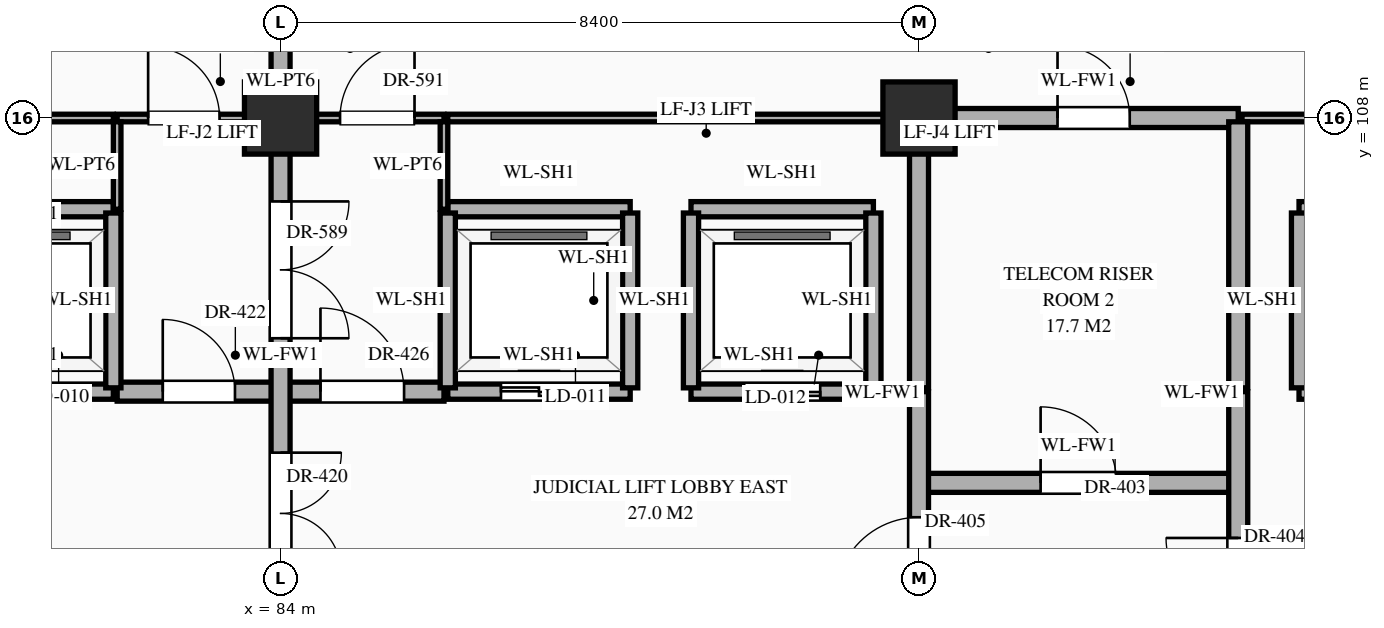
"""IFC4 building model, lengths in metres.
Left out: names, types, materials, properties, quantities, classifications, styles, units other than length and angle.
Written with IfcOpenShell. Run it as: python <this file> out.ifc"""

import sys

from ifc_helpers import new_model, si_unit, direction, frame, frame_2d, origin, origin_2d, place, context, subcontext, project, spatial, rectangle, extrude, element, fill, save


model = new_model("IFC4")
c1 = context("Model", 3, precision=1e-05, world=origin(), true_north=direction((0.0, 1.0)))
c2 = subcontext(c1, "Body", "Model", "MODEL_VIEW")
j1 = project(units=[si_unit("LENGTHUNIT", "METRE"), si_unit("PLANEANGLEUNIT", "RADIAN")], contexts=[c1])
p1 = place(None, origin())
s1 = spatial("IfcSite", under=j1, at=p1, CompositionType="ELEMENT")
p2 = place(p1, origin())
s2 = spatial("IfcBuilding", under=s1, at=p2, CompositionType="ELEMENT")
p3 = place(p2, frame((0.0, 0.0, -5.4)))
s3 = spatial("IfcBuildingStorey", under=s2, at=p3, CompositionType="ELEMENT", Elevation=-5.4)
for number, where, z_axis, x_axis in (
    (1, (84.0, 108.0, 0.0), (0.0, 0.0, 1.0), (1.0, 0.0, 0.0)),
    (2, (92.4, 108.0, 0.0), (0.0, 0.0, 1.0), (1.0, 0.0, 0.0)),
):
    element("IfcColumn", number, at=place(p3, frame(where, z_axis=z_axis, x_axis=x_axis)), inside=s3, PredefinedType="COLUMN", context=c2, shape_type="SweptSolid", body=[
        extrude(rectangle(XDim=0.95, YDim=0.95, at=origin_2d()), origin(), (0.0, 0.0, 1.0), 5.4),
    ])
p4 = place(p3, frame((92.4, 103.2, 0.0), z_axis=(0.0, 0.0, 1.0), x_axis=(1.0, 0.0, 0.0)))
e3 = element("IfcWall", 3, at=p4, inside=s3, PredefinedType="STANDARD", context=c2, shape_type="SweptSolid", body=[
    extrude(rectangle(XDim=4.2, YDim=0.25, at=frame_2d((2.1, 0.0))), origin(), (0.0, 0.0, 1.0), 5.1),
])
p5 = place(p4, frame((1.6, 0.0, 0.0)))
e4 = element("IfcOpeningElement", 4, at=p5, cuts=e3, PredefinedType="OPENING", context=c2, shape_type="SweptSolid", body=[
    extrude(rectangle(XDim=1.0, YDim=2.2, at=frame_2d((0.5, 1.1))), frame((0.0, 0.137, 0.0), z_axis=(0.0, -1.0, 0.0), x_axis=(1.0, 0.0, 0.0)), (0.0, 0.0, 1.0), 0.274),
])
p6 = place(p3, frame((79.4, 104.4, 0.0), z_axis=(0.0, 0.0, 1.0), x_axis=(1.0, 0.0, 0.0)))
e5 = element("IfcWall", 5, at=p6, inside=s3, PredefinedType="STANDARD", context=c2, shape_type="SweptSolid", body=[
    extrude(rectangle(XDim=2.4, YDim=0.2, at=frame_2d((1.2, 0.0))), origin(), (0.0, 0.0, 1.0), 5.1),
])
p7 = place(p6, frame((0.7, 0.0, 0.0)))
e6 = element("IfcOpeningElement", 6, at=p7, cuts=e5, PredefinedType="OPENING", context=c2, shape_type="SweptSolid", body=[
    extrude(rectangle(XDim=1.0, YDim=2.15, at=frame_2d((0.5, 1.075))), frame((0.0, 0.112, 0.0), z_axis=(0.0, -1.0, 0.0), x_axis=(1.0, 0.0, 0.0)), (0.0, 0.0, 1.0), 0.224),
])
p8 = place(p3, frame((81.85, 104.4, 0.0), z_axis=(0.0, 0.0, 1.0), x_axis=(1.0, 0.0, 0.0)))
e7 = element("IfcWall", 7, at=p8, inside=s3, PredefinedType="STANDARD", context=c2, shape_type="SweptSolid", body=[
    extrude(rectangle(XDim=4.3, YDim=0.25, at=frame_2d((2.15, 0.0))), origin(), (0.0, 0.0, 1.0), 5.1),
])
p9 = place(p8, frame((0.6, 0.0, 0.0)))
e8 = element("IfcOpeningElement", 8, at=p9, cuts=e7, PredefinedType="OPENING", context=c2, shape_type="SweptSolid", body=[
    extrude(rectangle(XDim=0.95, YDim=2.15, at=frame_2d((0.475, 1.075))), frame((0.0, 0.137, 0.0), z_axis=(0.0, -1.0, 0.0), x_axis=(1.0, 0.0, 0.0)), (0.0, 0.0, 1.0), 0.274),
])
p10 = place(p8, frame((2.675, 0.0, 0.0)))
e9 = element("IfcOpeningElement", 9, at=p10, cuts=e7, PredefinedType="OPENING", context=c2, shape_type="SweptSolid", body=[
    extrude(rectangle(XDim=1.1, YDim=2.2, at=frame_2d((0.55, 1.1))), frame((0.0, 0.137, 0.0), z_axis=(0.0, -1.0, 0.0), x_axis=(1.0, 0.0, 0.0)), (0.0, 0.0, 1.0), 0.274),
])
p11 = place(p3, frame((86.2, 104.4, 0.0), z_axis=(0.0, 0.0, 1.0), x_axis=(1.0, 0.0, 0.0)))
e10 = element("IfcWall", 10, at=p11, inside=s3, PredefinedType="STANDARD", context=c2, shape_type="SweptSolid", body=[
    extrude(rectangle(XDim=2.4, YDim=0.2, at=frame_2d((1.2, 0.0))), origin(), (0.0, 0.0, 1.0), 5.1),
])
p12 = place(p11, frame((0.7, 0.0, 0.0)))
e11 = element("IfcOpeningElement", 11, at=p12, cuts=e10, PredefinedType="OPENING", context=c2, shape_type="SweptSolid", body=[
    extrude(rectangle(XDim=1.0, YDim=2.15, at=frame_2d((0.5, 1.075))), frame((0.0, 0.112, 0.0), z_axis=(0.0, -1.0, 0.0), x_axis=(1.0, 0.0, 0.0)), (0.0, 0.0, 1.0), 0.224),
])
p13 = place(p3, frame((89.4, 104.4, 0.0), z_axis=(0.0, 0.0, 1.0), x_axis=(1.0, 0.0, 0.0)))
e12 = element("IfcWall", 12, at=p13, inside=s3, PredefinedType="STANDARD", context=c2, shape_type="SweptSolid", body=[
    extrude(rectangle(XDim=2.4, YDim=0.2, at=frame_2d((1.2, 0.0))), origin(), (0.0, 0.0, 1.0), 5.1),
])
p14 = place(p13, frame((0.7, 0.0, 0.0)))
e13 = element("IfcOpeningElement", 13, at=p14, cuts=e12, PredefinedType="OPENING", context=c2, shape_type="SweptSolid", body=[
    extrude(rectangle(XDim=1.0, YDim=2.15, at=frame_2d((0.5, 1.075))), frame((0.0, 0.112, 0.0), z_axis=(0.0, -1.0, 0.0), x_axis=(1.0, 0.0, 0.0)), (0.0, 0.0, 1.0), 0.224),
])
p15 = place(p3, frame((97.4, 104.4, 0.0), z_axis=(0.0, 0.0, 1.0), x_axis=(1.0, 0.0, 0.0)))
e14 = element("IfcWall", 14, at=p15, inside=s3, PredefinedType="STANDARD", context=c2, shape_type="SweptSolid", body=[
    extrude(rectangle(XDim=3.0, YDim=0.2, at=frame_2d((1.5, 0.0))), origin(), (0.0, 0.0, 1.0), 5.1),
])
p16 = place(p15, frame((0.9, 0.0, 0.0)))
e15 = element("IfcOpeningElement", 15, at=p16, cuts=e14, PredefinedType="OPENING", context=c2, shape_type="SweptSolid", body=[
    extrude(rectangle(XDim=1.2, YDim=2.15, at=frame_2d((0.6, 1.075))), frame((0.0, 0.112, 0.0), z_axis=(0.0, -1.0, 0.0), x_axis=(1.0, 0.0, 0.0)), (0.0, 0.0, 1.0), 0.224),
])
for number, where, z_axis, x_axis in (
    (16, (79.4, 106.8, 0.0), (0.0, 0.0, 1.0), (1.0, 0.0, 0.0)),
    (17, (86.2, 106.8, 0.0), (0.0, 0.0, 1.0), (1.0, 0.0, 0.0)),
    (18, (89.4, 106.8, 0.0), (0.0, 0.0, 1.0), (1.0, 0.0, 0.0)),
):
    element("IfcWall", number, at=place(p3, frame(where, z_axis=z_axis, x_axis=x_axis)), inside=s3, PredefinedType="STANDARD", context=c2, shape_type="SweptSolid", body=[
        extrude(rectangle(XDim=2.4, YDim=0.2, at=frame_2d((1.2, 0.0))), origin(), (0.0, 0.0, 1.0), 5.1),
    ])
p17 = place(p3, frame((97.4, 106.8, 0.0), z_axis=(0.0, 0.0, 1.0), x_axis=(1.0, 0.0, 0.0)))
e19 = element("IfcWall", 19, at=p17, inside=s3, PredefinedType="STANDARD", context=c2, shape_type="SweptSolid", body=[
    extrude(rectangle(XDim=3.0, YDim=0.2, at=frame_2d((1.5, 0.0))), origin(), (0.0, 0.0, 1.0), 5.1),
])
p18 = place(p3, frame((75.65, 108.0, 0.0), z_axis=(0.0, 0.0, 1.0), x_axis=(1.0, 0.0, 0.0)))
e20 = element("IfcWall", 20, at=p18, inside=s3, PredefinedType="STANDARD", context=c2, shape_type="SweptSolid", body=[
    extrude(rectangle(XDim=6.15, YDim=0.1, at=frame_2d((3.075, 0.0))), origin(), (0.0, 0.0, 1.0), 4.25),
])
p19 = place(p3, frame((81.85, 108.0, 0.0), z_axis=(0.0, 0.0, 1.0), x_axis=(1.0, 0.0, 0.0)))
e21 = element("IfcWall", 21, at=p19, inside=s3, PredefinedType="STANDARD", context=c2, shape_type="SweptSolid", body=[
    extrude(rectangle(XDim=4.3, YDim=0.1, at=frame_2d((2.15, 0.0))), origin(), (0.0, 0.0, 1.0), 4.25),
])
p20 = place(p19, frame((0.407, 0.0, 0.0)))
e22 = element("IfcOpeningElement", 22, at=p20, cuts=e21, PredefinedType="OPENING", context=c2, shape_type="SweptSolid", body=[
    extrude(rectangle(XDim=0.94, YDim=2.3, at=frame_2d((0.47, 1.15))), frame((0.0, 0.062, 0.0), z_axis=(0.0, -1.0, 0.0), x_axis=(1.0, 0.0, 0.0)), (0.0, 0.0, 1.0), 0.124),
])
p21 = place(p19, frame((2.933, 0.0, 0.0)))
e23 = element("IfcOpeningElement", 23, at=p21, cuts=e21, PredefinedType="OPENING", context=c2, shape_type="SweptSolid", body=[
    extrude(rectangle(XDim=0.98, YDim=2.35, at=frame_2d((0.49, 1.175))), frame((0.0, 0.062, 0.0), z_axis=(0.0, -1.0, 0.0), x_axis=(1.0, 0.0, 0.0)), (0.0, 0.0, 1.0), 0.124),
])
p22 = place(p3, frame((86.2, 108.0, 0.0), z_axis=(0.0, 0.0, 1.0), x_axis=(1.0, 0.0, 0.0)))
e24 = element("IfcWall", 24, at=p22, inside=s3, PredefinedType="STANDARD", context=c2, shape_type="SweptSolid", body=[
    extrude(rectangle(XDim=6.15, YDim=0.1, at=frame_2d((3.075, 0.0))), origin(), (0.0, 0.0, 1.0), 4.25),
])
p23 = place(p3, frame((92.4, 108.0, 0.0), z_axis=(0.0, 0.0, 1.0), x_axis=(1.0, 0.0, 0.0)))
e25 = element("IfcWall", 25, at=p23, inside=s3, PredefinedType="STANDARD", context=c2, shape_type="SweptSolid", body=[
    extrude(rectangle(XDim=4.2, YDim=0.25, at=frame_2d((2.1, 0.0))), origin(), (0.0, 0.0, 1.0), 4.25),
])
p24 = place(p23, frame((1.823, 0.0, 0.0)))
e26 = element("IfcOpeningElement", 26, at=p24, cuts=e25, PredefinedType="OPENING", context=c2, shape_type="SweptSolid", body=[
    extrude(rectangle(XDim=0.95, YDim=2.15, at=frame_2d((0.475, 1.075))), frame((0.0, 0.137, 0.0), z_axis=(0.0, -1.0, 0.0), x_axis=(1.0, 0.0, 0.0)), (0.0, 0.0, 1.0), 0.274),
])
p25 = place(p3, frame((96.65, 108.0, 0.0), z_axis=(0.0, 0.0, 1.0), x_axis=(1.0, 0.0, 0.0)))
e27 = element("IfcWall", 27, at=p25, inside=s3, PredefinedType="STANDARD", context=c2, shape_type="SweptSolid", body=[
    extrude(rectangle(XDim=4.1, YDim=0.1, at=frame_2d((2.05, 0.0))), origin(), (0.0, 0.0, 1.0), 4.25),
])
p26 = place(p3, frame((81.8, 104.45, 0.0), z_axis=(0.0, 0.0, 1.0), x_axis=(0.0, 1.0, 0.0)))
e28 = element("IfcWall", 28, at=p26, inside=s3, PredefinedType="STANDARD", context=c2, shape_type="SweptSolid", body=[
    extrude(rectangle(XDim=2.3, YDim=0.2, at=frame_2d((1.15, 0.0))), origin(), (0.0, 0.0, 1.0), 5.1),
])
p27 = place(p3, frame((81.85, 106.8, 0.0), z_axis=(0.0, 0.0, 1.0), x_axis=(0.0, 1.0, 0.0)))
e29 = element("IfcWall", 29, at=p27, inside=s3, PredefinedType="STANDARD", context=c2, shape_type="SweptSolid", body=[
    extrude(rectangle(XDim=1.15, YDim=0.1, at=frame_2d((0.575, 0.0))), origin(), (0.0, 0.0, 1.0), 5.1),
])
p28 = place(p3, frame((84.0, 79.2, 0.0), z_axis=(0.0, 0.0, 1.0), x_axis=(0.0, 1.0, 0.0)))
e30 = element("IfcWall", 30, at=p28, inside=s3, PredefinedType="STANDARD", context=c2, shape_type="SweptSolid", body=[
    extrude(rectangle(XDim=35.96, YDim=0.25, at=frame_2d((17.98, 0.0))), origin(), (0.0, 0.0, 1.0), 4.35),
])
p29 = place(p28, frame((22.798, 0.0, 0.0)))
e31 = element("IfcOpeningElement", 31, at=p29, cuts=e30, PredefinedType="OPENING", context=c2, shape_type="SweptSolid", body=[
    extrude(rectangle(XDim=1.6, YDim=2.3, at=frame_2d((0.8, 1.15))), frame((0.0, 0.137, 0.0), z_axis=(0.0, -1.0, 0.0), x_axis=(1.0, 0.0, 0.0)), (0.0, 0.0, 1.0), 0.274),
])
p30 = place(p28, frame((12.528, 0.0, 0.0)))
e32 = element("IfcOpeningElement", 32, at=p30, cuts=e30, PredefinedType="OPENING", context=c2, shape_type="SweptSolid", body=[
    extrude(rectangle(XDim=0.95, YDim=2.15, at=frame_2d((0.475, 1.075))), frame((0.0, 0.137, 0.0), z_axis=(0.0, -1.0, 0.0), x_axis=(1.0, 0.0, 0.0)), (0.0, 0.0, 1.0), 0.274),
])
p31 = place(p28, frame((15.323, 0.0, 0.0)))
e33 = element("IfcOpeningElement", 33, at=p31, cuts=e30, PredefinedType="OPENING", context=c2, shape_type="SweptSolid", body=[
    extrude(rectangle(XDim=0.95, YDim=2.15, at=frame_2d((0.475, 1.075))), frame((0.0, 0.137, 0.0), z_axis=(0.0, -1.0, 0.0), x_axis=(1.0, 0.0, 0.0)), (0.0, 0.0, 1.0), 0.274),
])
p32 = place(p28, frame((25.903, 0.0, 0.0)))
e34 = element("IfcOpeningElement", 34, at=p32, cuts=e30, PredefinedType="OPENING", context=c2, shape_type="SweptSolid", body=[
    extrude(rectangle(XDim=1.8, YDim=2.35, at=frame_2d((0.9, 1.175))), frame((0.0, 0.137, 0.0), z_axis=(0.0, -1.0, 0.0), x_axis=(1.0, 0.0, 0.0)), (0.0, 0.0, 1.0), 0.274),
])
p33 = place(p28, frame((29.722, 0.0, 0.0)))
e35 = element("IfcOpeningElement", 35, at=p33, cuts=e30, PredefinedType="OPENING", context=c2, shape_type="SweptSolid", body=[
    extrude(rectangle(XDim=0.95, YDim=2.15, at=frame_2d((0.475, 1.075))), frame((0.0, 0.137, 0.0), z_axis=(0.0, -1.0, 0.0), x_axis=(1.0, 0.0, 0.0)), (0.0, 0.0, 1.0), 0.274),
])
p34 = place(p28, frame((5.327, 0.0, 0.0)))
e36 = element("IfcOpeningElement", 36, at=p34, cuts=e30, PredefinedType="OPENING", context=c2, shape_type="SweptSolid", body=[
    extrude(rectangle(XDim=0.95, YDim=2.15, at=frame_2d((0.475, 1.075))), frame((0.0, 0.137, 0.0), z_axis=(0.0, -1.0, 0.0), x_axis=(1.0, 0.0, 0.0)), (0.0, 0.0, 1.0), 0.274),
])
p35 = place(p3, frame((86.15, 106.8, 0.0), z_axis=(0.0, 0.0, 1.0), x_axis=(0.0, 1.0, 0.0)))
e37 = element("IfcWall", 37, at=p35, inside=s3, PredefinedType="STANDARD", context=c2, shape_type="SweptSolid", body=[
    extrude(rectangle(XDim=1.15, YDim=0.1, at=frame_2d((0.575, 0.0))), origin(), (0.0, 0.0, 1.0), 5.1),
])
for number, where, z_axis, x_axis in (
    (38, (86.2, 104.45, 0.0), (0.0, 0.0, 1.0), (0.0, 1.0, 0.0)),
    (39, (88.6, 104.45, 0.0), (0.0, 0.0, 1.0), (0.0, 1.0, 0.0)),
    (40, (89.4, 104.45, 0.0), (0.0, 0.0, 1.0), (0.0, 1.0, 0.0)),
    (41, (91.8, 104.45, 0.0), (0.0, 0.0, 1.0), (0.0, 1.0, 0.0)),
):
    element("IfcWall", number, at=place(p3, frame(where, z_axis=z_axis, x_axis=x_axis)), inside=s3, PredefinedType="STANDARD", context=c2, shape_type="SweptSolid", body=[
        extrude(rectangle(XDim=2.3, YDim=0.2, at=frame_2d((1.15, 0.0))), origin(), (0.0, 0.0, 1.0), 5.1),
    ])
p36 = place(p3, frame((92.4, 100.8, 0.0), z_axis=(0.0, 0.0, 1.0), x_axis=(0.0, 1.0, 0.0)))
e42 = element("IfcWall", 42, at=p36, inside=s3, PredefinedType="STANDARD", context=c2, shape_type="SweptSolid", body=[
    extrude(rectangle(XDim=3.6, YDim=0.25, at=frame_2d((1.8, 0.0))), origin(), (0.0, 0.0, 1.0), 4.35),
])
p37 = place(p36, frame((0.847, 0.0, 0.0)))
e43 = element("IfcOpeningElement", 43, at=p37, cuts=e42, PredefinedType="OPENING", context=c2, shape_type="SweptSolid", body=[
    extrude(rectangle(XDim=1.1, YDim=2.2, at=frame_2d((0.55, 1.1))), frame((0.0, 0.137, 0.0), z_axis=(0.0, -1.0, 0.0), x_axis=(1.0, 0.0, 0.0)), (0.0, 0.0, 1.0), 0.274),
])
p38 = place(p3, frame((92.4, 104.45, 0.0), z_axis=(0.0, 0.0, 1.0), x_axis=(0.0, 1.0, 0.0)))
e44 = element("IfcWall", 44, at=p38, inside=s3, PredefinedType="STANDARD", context=c2, shape_type="SweptSolid", body=[
    extrude(rectangle(XDim=3.5, YDim=0.25, at=frame_2d((1.75, 0.0))), origin(), (0.0, 0.0, 1.0), 4.35),
])
p39 = place(p3, frame((96.6, 100.8, 0.0), z_axis=(0.0, 0.0, 1.0), x_axis=(0.0, 1.0, 0.0)))
e45 = element("IfcWall", 45, at=p39, inside=s3, PredefinedType="STANDARD", context=c2, shape_type="SweptSolid", body=[
    extrude(rectangle(XDim=3.6, YDim=0.25, at=frame_2d((1.8, 0.0))), origin(), (0.0, 0.0, 1.0), 4.65),
])
p40 = place(p39, frame((0.725, 0.0, 0.0)))
e46 = element("IfcOpeningElement", 46, at=p40, cuts=e45, PredefinedType="OPENING", context=c2, shape_type="SweptSolid", body=[
    extrude(rectangle(XDim=0.95, YDim=2.15, at=frame_2d((0.475, 1.075))), frame((0.0, 0.137, 0.0), z_axis=(0.0, -1.0, 0.0), x_axis=(1.0, 0.0, 0.0)), (0.0, 0.0, 1.0), 0.274),
])
p41 = place(p3, frame((96.6, 104.45, 0.0), z_axis=(0.0, 0.0, 1.0), x_axis=(0.0, 1.0, 0.0)))
e47 = element("IfcWall", 47, at=p41, inside=s3, PredefinedType="STANDARD", context=c2, shape_type="SweptSolid", body=[
    extrude(rectangle(XDim=3.5, YDim=0.25, at=frame_2d((1.75, 0.0))), origin(), (0.0, 0.0, 1.0), 4.65),
])
p42 = place(p3, frame((97.4, 104.45, 0.0), z_axis=(0.0, 0.0, 1.0), x_axis=(0.0, 1.0, 0.0)))
e48 = element("IfcWall", 48, at=p42, inside=s3, PredefinedType="STANDARD", context=c2, shape_type="SweptSolid", body=[
    extrude(rectangle(XDim=2.3, YDim=0.2, at=frame_2d((1.15, 0.0))), origin(), (0.0, 0.0, 1.0), 5.1),
])
p43 = place(p7, origin())
e49 = element("IfcDoor", 49, at=p43, inside=s3, OperationType="DOUBLE_DOOR_SLIDING", PredefinedType="DOOR", context=c2, shape_type="SweptSolid", body=[
    extrude(rectangle(XDim=1.0, YDim=2.15, at=frame_2d((0.5, 1.075))), frame((0.0, 0.025, 0.0), z_axis=(0.0, -1.0, 0.0), x_axis=(1.0, 0.0, 0.0)), (0.0, 0.0, 1.0), 0.05),
])
fill(e6, e49)
p44 = place(p12, origin())
e50 = element("IfcDoor", 50, at=p44, inside=s3, OperationType="DOUBLE_DOOR_SLIDING", PredefinedType="DOOR", context=c2, shape_type="SweptSolid", body=[
    extrude(rectangle(XDim=1.0, YDim=2.15, at=frame_2d((0.5, 1.075))), frame((0.0, 0.025, 0.0), z_axis=(0.0, -1.0, 0.0), x_axis=(1.0, 0.0, 0.0)), (0.0, 0.0, 1.0), 0.05),
])
fill(e11, e50)
p45 = place(p14, origin())
e51 = element("IfcDoor", 51, at=p45, inside=s3, OperationType="DOUBLE_DOOR_SLIDING", PredefinedType="DOOR", context=c2, shape_type="SweptSolid", body=[
    extrude(rectangle(XDim=1.0, YDim=2.15, at=frame_2d((0.5, 1.075))), frame((0.0, 0.025, 0.0), z_axis=(0.0, -1.0, 0.0), x_axis=(1.0, 0.0, 0.0)), (0.0, 0.0, 1.0), 0.05),
])
fill(e13, e51)
p46 = place(p5, origin())
e52 = element("IfcDoor", 52, at=p46, inside=s3, OperationType="SINGLE_SWING_LEFT", PredefinedType="DOOR", context=c2, shape_type="SweptSolid", body=[
    extrude(rectangle(XDim=1.0, YDim=2.2, at=frame_2d((0.5, 1.1))), frame((0.0, 0.025, 0.0), z_axis=(0.0, -1.0, 0.0), x_axis=(1.0, 0.0, 0.0)), (0.0, 0.0, 1.0), 0.05),
])
fill(e4, e52)
p47 = place(p40, origin())
e53 = element("IfcDoor", 53, at=p47, inside=s3, OperationType="SINGLE_SWING_RIGHT", PredefinedType="DOOR", context=c2, shape_type="SweptSolid", body=[
    extrude(rectangle(XDim=0.95, YDim=2.15, at=frame_2d((0.475, 1.075))), frame((0.0, 0.025, 0.0), z_axis=(0.0, -1.0, 0.0), x_axis=(1.0, 0.0, 0.0)), (0.0, 0.0, 1.0), 0.05),
])
fill(e46, e53)
p48 = place(p37, origin())
e54 = element("IfcDoor", 54, at=p48, inside=s3, OperationType="SINGLE_SWING_LEFT", PredefinedType="DOOR", context=c2, shape_type="SweptSolid", body=[
    extrude(rectangle(XDim=1.1, YDim=2.2, at=frame_2d((0.55, 1.1))), frame((0.0, 0.025, 0.0), z_axis=(0.0, -1.0, 0.0), x_axis=(1.0, 0.0, 0.0)), (0.0, 0.0, 1.0), 0.05),
])
fill(e43, e54)
p49 = place(p24, origin())
e55 = element("IfcDoor", 55, at=p49, inside=s3, OperationType="SINGLE_SWING_LEFT", PredefinedType="DOOR", context=c2, shape_type="SweptSolid", body=[
    extrude(rectangle(XDim=0.95, YDim=2.15, at=frame_2d((0.475, 1.075))), frame((0.0, 0.025, 0.0), z_axis=(0.0, -1.0, 0.0), x_axis=(1.0, 0.0, 0.0)), (0.0, 0.0, 1.0), 0.05),
])
fill(e26, e55)
p50 = place(p29, frame((1.6, 0.0, 0.0), z_axis=(0.0, 0.0, 1.0), x_axis=(-1.0, 0.0, 0.0)))
e56 = element("IfcDoor", 56, at=p50, inside=s3, OperationType="DOUBLE_DOOR_SINGLE_SWING", PredefinedType="DOOR", context=c2, shape_type="SweptSolid", body=[
    extrude(rectangle(XDim=1.6, YDim=2.3, at=frame_2d((0.8, 1.15))), frame((0.0, 0.025, 0.0), z_axis=(0.0, -1.0, 0.0), x_axis=(1.0, 0.0, 0.0)), (0.0, 0.0, 1.0), 0.05),
])
fill(e31, e56)
p51 = place(p9, origin())
e57 = element("IfcDoor", 57, at=p51, inside=s3, OperationType="SINGLE_SWING_LEFT", PredefinedType="DOOR", context=c2, shape_type="SweptSolid", body=[
    extrude(rectangle(XDim=0.95, YDim=2.15, at=frame_2d((0.475, 1.075))), frame((0.0, 0.025, 0.0), z_axis=(0.0, -1.0, 0.0), x_axis=(1.0, 0.0, 0.0)), (0.0, 0.0, 1.0), 0.05),
])
fill(e8, e57)
p52 = place(p10, origin())
e58 = element("IfcDoor", 58, at=p52, inside=s3, OperationType="SINGLE_SWING_LEFT", PredefinedType="DOOR", context=c2, shape_type="SweptSolid", body=[
    extrude(rectangle(XDim=1.1, YDim=2.2, at=frame_2d((0.55, 1.1))), frame((0.0, 0.025, 0.0), z_axis=(0.0, -1.0, 0.0), x_axis=(1.0, 0.0, 0.0)), (0.0, 0.0, 1.0), 0.05),
])
fill(e9, e58)
p53 = place(p32, frame((1.8, 0.0, 0.0), z_axis=(0.0, 0.0, 1.0), x_axis=(-1.0, 0.0, 0.0)))
e59 = element("IfcDoor", 59, at=p53, inside=s3, OperationType="DOUBLE_DOOR_SINGLE_SWING", PredefinedType="DOOR", context=c2, shape_type="SweptSolid", body=[
    extrude(rectangle(XDim=1.8, YDim=2.35, at=frame_2d((0.9, 1.175))), frame((0.0, 0.025, 0.0), z_axis=(0.0, -1.0, 0.0), x_axis=(1.0, 0.0, 0.0)), (0.0, 0.0, 1.0), 0.05),
])
fill(e34, e59)
p54 = place(p20, origin())
e60 = element("IfcDoor", 60, at=p54, inside=s3, OperationType="SINGLE_SWING_LEFT", PredefinedType="DOOR", context=c2, shape_type="SweptSolid", body=[
    extrude(rectangle(XDim=0.94, YDim=2.3, at=frame_2d((0.47, 1.15))), frame((0.0, 0.025, 0.0), z_axis=(0.0, -1.0, 0.0), x_axis=(1.0, 0.0, 0.0)), (0.0, 0.0, 1.0), 0.05),
])
fill(e22, e60)
p55 = place(p21, origin())
e61 = element("IfcDoor", 61, at=p55, inside=s3, OperationType="SINGLE_SWING_RIGHT", PredefinedType="DOOR", context=c2, shape_type="SweptSolid", body=[
    extrude(rectangle(XDim=0.98, YDim=2.35, at=frame_2d((0.49, 1.175))), frame((0.0, 0.025, 0.0), z_axis=(0.0, -1.0, 0.0), x_axis=(1.0, 0.0, 0.0)), (0.0, 0.0, 1.0), 0.05),
])
fill(e23, e61)
save(model, sys.argv[1])
